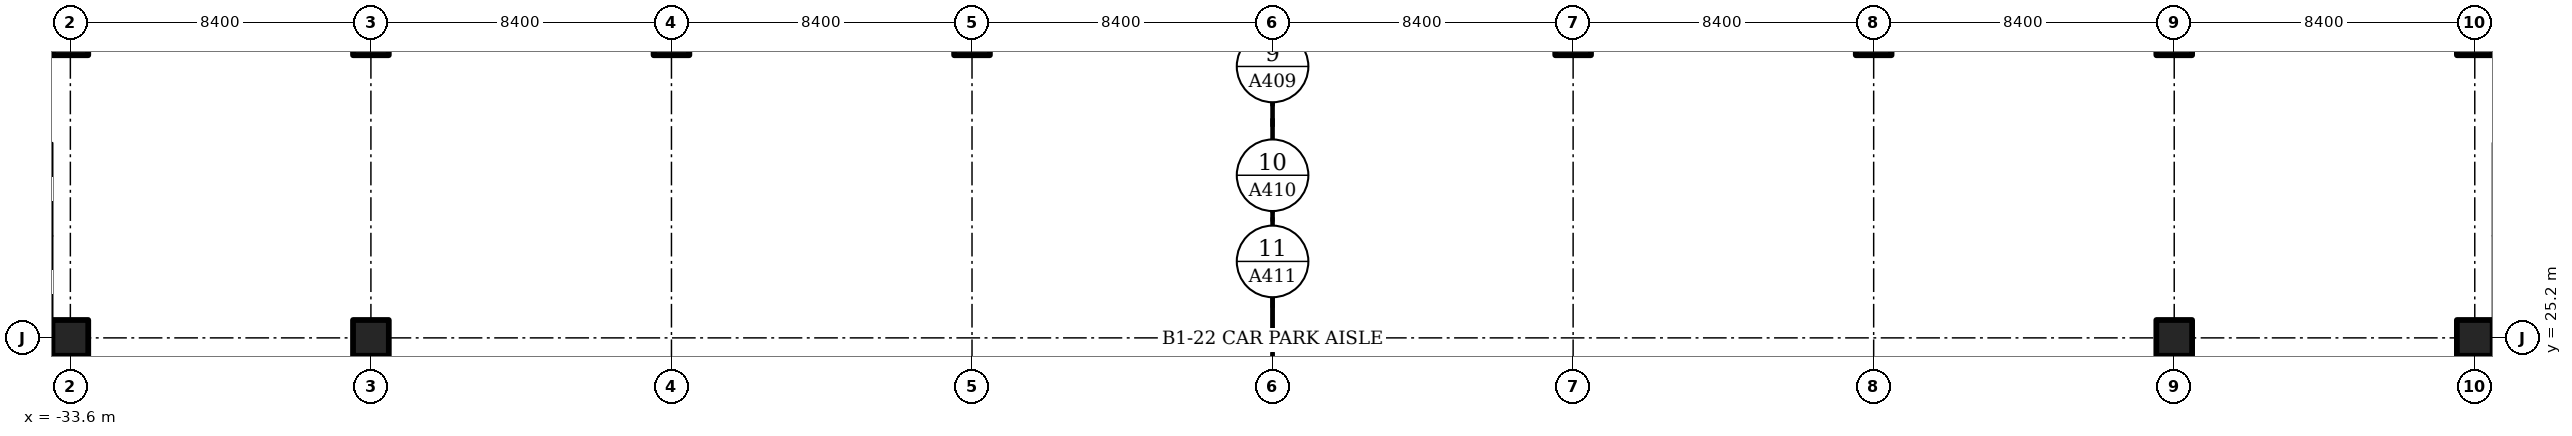
"""IFC4 building model, lengths in metres.
Left out: names, types, materials, properties, quantities, classifications, styles, units other than length and angle.
Written with IfcOpenShell. Run it as: python <this file> out.ifc"""

import sys

from ifc_helpers import new_model, si_unit, direction, frame, origin, origin_2d, place, context, subcontext, project, spatial, rectangle, extrude, element, save


model = new_model("IFC4")
c1 = context("Model", 3, precision=1e-05, world=origin(), true_north=direction((0.0, 1.0)))
c2 = subcontext(c1, "Body", "Model", "MODEL_VIEW")
j1 = project(units=[si_unit("LENGTHUNIT", "METRE"), si_unit("PLANEANGLEUNIT", "RADIAN")], contexts=[c1])
p1 = place(None, origin())
s1 = spatial("IfcSite", under=j1, at=p1, CompositionType="ELEMENT")
p2 = place(p1, origin())
s2 = spatial("IfcBuilding", under=s1, at=p2, CompositionType="ELEMENT")
p3 = place(p2, frame((0.0, 0.0, -5.0)))
s3 = spatial("IfcBuildingStorey", under=s2, at=p3, CompositionType="ELEMENT", Elevation=-5.0)
for number, where, z_axis, x_axis in (
    (1, (-33.6, 25.2, -0.3), (0.0, 0.0, 1.0), (1.0, 0.0, 0.0)),
    (2, (-33.6, 33.6, -0.3), (0.0, 0.0, 1.0), (1.0, 0.0, 0.0)),
    (3, (-25.2, 25.2, -0.3), (0.0, 0.0, 1.0), (1.0, 0.0, 0.0)),
    (4, (-25.2, 33.6, -0.3), (0.0, 0.0, 1.0), (1.0, 0.0, 0.0)),
    (5, (-16.8, 33.6, -0.3), (0.0, 0.0, 1.0), (1.0, 0.0, 0.0)),
    (6, (-8.4, 33.6, -0.3), (0.0, 0.0, 1.0), (1.0, 0.0, 0.0)),
    (7, (0.0, 33.6, -0.3), (0.0, 0.0, 1.0), (1.0, 0.0, 0.0)),
    (8, (8.4, 33.6, -0.3), (0.0, 0.0, 1.0), (1.0, 0.0, 0.0)),
    (9, (16.8, 33.6, -0.3), (0.0, 0.0, 1.0), (1.0, 0.0, 0.0)),
    (10, (25.2, 25.2, -0.3), (0.0, 0.0, 1.0), (1.0, 0.0, 0.0)),
    (11, (25.2, 33.6, -0.3), (0.0, 0.0, 1.0), (1.0, 0.0, 0.0)),
    (12, (33.6, 25.2, -0.3), (0.0, 0.0, 1.0), (1.0, 0.0, 0.0)),
    (13, (33.6, 33.6, -0.3), (0.0, 0.0, 1.0), (1.0, 0.0, 0.0)),
):
    element("IfcColumn", number, at=place(p3, frame(where, z_axis=z_axis, x_axis=x_axis)), inside=s3, PredefinedType="COLUMN", context=c2, shape_type="SweptSolid", body=[
        extrude(rectangle(XDim=1.0, YDim=1.0, at=origin_2d()), origin(), (0.0, 0.0, 1.0), 4.95),
    ])
save(model, sys.argv[1])
